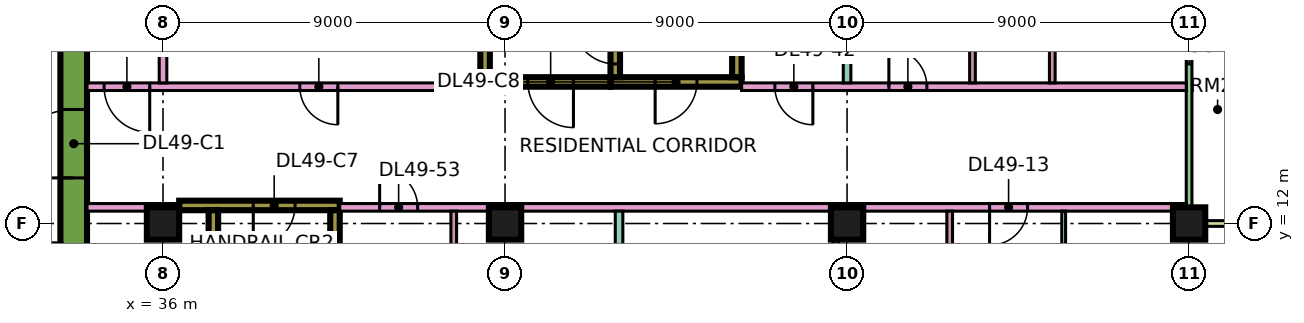
"""IFC4 building model, lengths in metres.
Left out: names, types, materials, properties, quantities, classifications, styles, units other than length and angle.
Written with IfcOpenShell. Run it as: python <this file> out.ifc"""

import sys

from ifc_helpers import new_model, si_unit, direction, frame, frame_2d, origin, origin_2d, place, context, subcontext, project, spatial, rectangle, extrude, element, fill, save


model = new_model("IFC4")
c1 = context("Model", 3, precision=1e-05, world=origin(), true_north=direction((0.0, 1.0)))
c2 = subcontext(c1, "Body", "Model", "MODEL_VIEW")
j1 = project(units=[si_unit("LENGTHUNIT", "METRE"), si_unit("PLANEANGLEUNIT", "RADIAN")], contexts=[c1])
p1 = place(None, origin())
s1 = spatial("IfcSite", under=j1, at=p1, CompositionType="ELEMENT")
p2 = place(p1, origin())
s2 = spatial("IfcBuilding", under=s1, at=p2, CompositionType="ELEMENT")
p3 = place(p2, frame((0.0, 0.0, 211.65)))
s3 = spatial("IfcBuildingStorey", under=s2, at=p3, CompositionType="ELEMENT", Elevation=211.65)
for number, where, z_axis, x_axis in (
    (1, (36.0, 12.0, 0.0), (0.0, 0.0, 1.0), (1.0, 0.0, 0.0)),
    (2, (45.0, 12.0, 0.0), (0.0, 0.0, 1.0), (1.0, 0.0, 0.0)),
    (3, (54.0, 12.0, 0.0), (0.0, 0.0, 1.0), (1.0, 0.0, 0.0)),
    (4, (63.0, 12.0, 0.0), (0.0, 0.0, 1.0), (1.0, 0.0, 0.0)),
):
    element("IfcColumn", number, at=place(p3, frame(where, z_axis=z_axis, x_axis=x_axis)), inside=s3, PredefinedType="COLUMN", context=c2, shape_type="SweptSolid", body=[
        extrude(rectangle(XDim=0.85, YDim=0.85, at=origin_2d()), origin(), (0.0, 0.0, 1.0), 3.75),
    ])
p4 = place(p3, frame((33.65, 7.7, 0.0), z_axis=(0.0, 0.0, 1.0), x_axis=(0.0, 1.0, 0.0)))
e5 = element("IfcWall", 5, at=p4, inside=s3, PredefinedType="SHEAR", context=c2, shape_type="SweptSolid", body=[
    extrude(rectangle(XDim=11.6, YDim=0.7, at=frame_2d((5.8, 0.0))), origin(), (0.0, 0.0, 1.0), 3.75),
])
p5 = place(p4, frame((5.5, 0.0, 0.0)))
e6 = element("IfcOpeningElement", 6, at=p5, cuts=e5, PredefinedType="OPENING", context=c2, shape_type="SweptSolid", body=[
    extrude(rectangle(XDim=1.8, YDim=2.4, at=frame_2d((0.9, 1.2))), frame((0.0, 0.36, 0.0), z_axis=(0.0, -1.0, 0.0), x_axis=(1.0, 0.0, 0.0)), (0.0, 0.0, 1.0), 0.72),
])
p6 = place(p3, frame((36.425, 12.475, 0.0), z_axis=(0.0, 0.0, 1.0), x_axis=(1.0, 0.0, 0.0)))
e7 = element("IfcWall", 7, at=p6, inside=s3, PredefinedType="SHEAR", context=c2, shape_type="SweptSolid", body=[
    extrude(rectangle(XDim=4.225, YDim=0.25, at=frame_2d((2.112, 0.0))), origin(), (0.0, 0.0, 1.0), 3.75),
])
p7 = place(p6, frame((1.95, 0.0, 0.0)))
e8 = element("IfcOpeningElement", 8, at=p7, cuts=e7, PredefinedType="OPENING", context=c2, shape_type="SweptSolid", body=[
    extrude(rectangle(XDim=1.1, YDim=2.2, at=frame_2d((0.55, 1.1))), frame((0.0, 0.135, 0.0), z_axis=(0.0, -1.0, 0.0), x_axis=(1.0, 0.0, 0.0)), (0.0, 0.0, 1.0), 0.27),
])
for number, where, z_axis, x_axis in (
    (9, (37.325, 5.85, 0.0), (0.0, 0.0, 1.0), (0.0, 1.0, 0.0)),
    (10, (40.525, 5.85, 0.0), (0.0, 0.0, 1.0), (0.0, 1.0, 0.0)),
):
    element("IfcWall", number, at=place(p3, frame(where, z_axis=z_axis, x_axis=x_axis)), inside=s3, PredefinedType="SHEAR", context=c2, shape_type="SweptSolid", body=[
        extrude(rectangle(XDim=6.5, YDim=0.25, at=frame_2d((3.25, 0.0))), origin(), (0.0, 0.0, 1.0), 3.75),
    ])
p8 = place(p3, frame((47.775, 15.725, 0.0), z_axis=(0.0, 0.0, 1.0), x_axis=(1.0, 0.0, 0.0)))
e11 = element("IfcWall", 11, at=p8, inside=s3, PredefinedType="SHEAR", context=c2, shape_type="SweptSolid", body=[
    extrude(rectangle(XDim=3.45, YDim=0.25, at=frame_2d((1.725, 0.0))), origin(), (0.0, 0.0, 1.0), 3.75),
])
p9 = place(p8, frame((1.175, 0.0, 0.0)))
e12 = element("IfcOpeningElement", 12, at=p9, cuts=e11, PredefinedType="OPENING", context=c2, shape_type="SweptSolid", body=[
    extrude(rectangle(XDim=1.1, YDim=2.2, at=frame_2d((0.55, 1.1))), frame((0.0, 0.135, 0.0), z_axis=(0.0, -1.0, 0.0), x_axis=(1.0, 0.0, 0.0)), (0.0, 0.0, 1.0), 0.27),
])
p10 = place(p3, frame((47.9, 15.85, 0.0), z_axis=(0.0, 0.0, 1.0), x_axis=(0.0, 1.0, 0.0)))
e13 = element("IfcWall", 13, at=p10, inside=s3, PredefinedType="SHEAR", context=c2, shape_type="SweptSolid", body=[
    extrude(rectangle(XDim=6.5, YDim=0.25, at=frame_2d((3.25, 0.0))), origin(), (0.0, 0.0, 1.0), 3.75),
])
p11 = place(p10, frame((0.35, 0.0, 0.0)))
e14 = element("IfcOpeningElement", 14, at=p11, cuts=e13, PredefinedType="OPENING", context=c2, shape_type="SweptSolid", body=[
    extrude(rectangle(XDim=1.1, YDim=2.2, at=frame_2d((0.55, 1.1))), frame((0.0, 0.135, 0.0), z_axis=(0.0, -1.0, 0.0), x_axis=(1.0, 0.0, 0.0)), (0.0, 0.0, 1.0), 0.27),
])
p12 = place(p3, frame((51.1, 15.85, 0.0), z_axis=(0.0, 0.0, 1.0), x_axis=(0.0, 1.0, 0.0)))
e15 = element("IfcWall", 15, at=p12, inside=s3, PredefinedType="SHEAR", context=c2, shape_type="SweptSolid", body=[
    extrude(rectangle(XDim=6.5, YDim=0.25, at=frame_2d((3.25, 0.0))), origin(), (0.0, 0.0, 1.0), 3.75),
])
p13 = place(p3, frame((44.35, 15.725, 0.0), z_axis=(0.0, 0.0, 1.0), x_axis=(1.0, 0.0, 0.0)))
e16 = element("IfcWall", 16, at=p13, inside=s3, PredefinedType="SHEAR", context=c2, shape_type="SweptSolid", body=[
    extrude(rectangle(XDim=3.425, YDim=0.25, at=frame_2d((1.712, 0.0))), origin(), (0.0, 0.0, 1.0), 3.75),
])
p14 = place(p13, frame((1.25, 0.0, 0.0)))
e17 = element("IfcOpeningElement", 17, at=p14, cuts=e16, PredefinedType="OPENING", context=c2, shape_type="SweptSolid", body=[
    extrude(rectangle(XDim=1.2, YDim=2.2, at=frame_2d((0.6, 1.1))), frame((0.0, 0.135, 0.0), z_axis=(0.0, -1.0, 0.0), x_axis=(1.0, 0.0, 0.0)), (0.0, 0.0, 1.0), 0.27),
])
p15 = place(p3, frame((44.475, 15.85, 0.0), z_axis=(0.0, 0.0, 1.0), x_axis=(0.0, 1.0, 0.0)))
e18 = element("IfcWall", 18, at=p15, inside=s3, PredefinedType="SHEAR", context=c2, shape_type="SweptSolid", body=[
    extrude(rectangle(XDim=6.5, YDim=0.25, at=frame_2d((3.25, 0.0))), origin(), (0.0, 0.0, 1.0), 3.75),
])
p16 = place(p15, frame((1.75, 0.0, 0.0)))
e19 = element("IfcOpeningElement", 19, at=p16, cuts=e18, PredefinedType="OPENING", context=c2, shape_type="SweptSolid", body=[
    extrude(rectangle(XDim=1.1, YDim=2.2, at=frame_2d((0.55, 1.1))), frame((0.0, 0.135, 0.0), z_axis=(0.0, -1.0, 0.0), x_axis=(1.0, 0.0, 0.0)), (0.0, 0.0, 1.0), 0.27),
])
p17 = place(p15, frame((4.3, 0.0, 0.0)))
e20 = element("IfcOpeningElement", 20, at=p17, cuts=e18, PredefinedType="OPENING", context=c2, shape_type="SweptSolid", body=[
    extrude(rectangle(XDim=1.1, YDim=2.2, at=frame_2d((0.55, 1.1))), frame((0.0, 0.135, 0.0), z_axis=(0.0, -1.0, 0.0), x_axis=(1.0, 0.0, 0.0)), (0.0, 0.0, 1.0), 0.27),
])
p18 = place(p3, frame((63.0, 12.075, 0.0), z_axis=(0.0, 0.0, 1.0), x_axis=(0.0, 1.0, 0.0)))
e21 = element("IfcWall", 21, at=p18, inside=s3, PredefinedType="SOLIDWALL", context=c2, shape_type="SweptSolid", body=[
    extrude(rectangle(XDim=10.35, YDim=0.15, at=frame_2d((5.175, 0.0))), origin(), (0.0, 0.0, 1.0), 3.35),
])
p19 = place(p18, frame((4.125, 0.0, 0.45)))
e22 = element("IfcOpeningElement", 22, at=p19, cuts=e21, PredefinedType="OPENING", context=c2, shape_type="SweptSolid", body=[
    extrude(rectangle(XDim=1.8, YDim=2.4, at=frame_2d((0.9, 1.2))), frame((0.0, 0.085, 0.0), z_axis=(0.0, -1.0, 0.0), x_axis=(1.0, 0.0, 0.0)), (0.0, 0.0, 1.0), 0.17),
])
p20 = place(p18, frame((7.538, 0.0, 0.0)))
e23 = element("IfcOpeningElement", 23, at=p20, cuts=e21, PredefinedType="OPENING", context=c2, shape_type="SweptSolid", body=[
    extrude(rectangle(XDim=1.8, YDim=2.4, at=frame_2d((0.9, 1.2))), frame((0.0, 0.085, 0.0), z_axis=(0.0, -1.0, 0.0), x_axis=(1.0, 0.0, 0.0)), (0.0, 0.0, 1.0), 0.17),
])
p21 = place(p3, frame((64.5, 12.0, 0.0), z_axis=(0.0, 0.0, 1.0), x_axis=(-1.0, 0.0, 0.0)))
e24 = element("IfcWall", 24, at=p21, inside=s3, PredefinedType="SOLIDWALL", context=c2, shape_type="SweptSolid", body=[
    extrude(rectangle(XDim=1.5, YDim=0.15, at=frame_2d((0.75, 0.0))), origin(), (0.0, 0.0, 1.0), 3.35),
])
p22 = place(p3, frame((34.0, 12.425, 0.0), z_axis=(0.0, 0.0, 1.0), x_axis=(1.0, 0.0, 0.0)))
e25 = element("IfcWall", 25, at=p22, inside=s3, PredefinedType="PARTITIONING", context=c2, shape_type="SweptSolid", body=[
    extrude(rectangle(XDim=2.426, YDim=0.2, at=frame_2d((1.213, 0.0))), origin(), (0.0, 0.0, 1.0), 3.35),
])
p23 = place(p3, frame((34.0, 15.6, 0.0), z_axis=(0.0, 0.0, 1.0), x_axis=(1.0, 0.0, 0.0)))
e26 = element("IfcWall", 26, at=p23, inside=s3, PredefinedType="PARTITIONING", context=c2, shape_type="SweptSolid", body=[
    extrude(rectangle(XDim=10.35, YDim=0.2, at=frame_2d((5.175, 0.0))), origin(), (0.0, 0.0, 1.0), 3.35),
])
p24 = place(p23, frame((5.6, 0.0, 0.0)))
e27 = element("IfcOpeningElement", 27, at=p24, cuts=e26, PredefinedType="OPENING", context=c2, shape_type="SweptSolid", body=[
    extrude(rectangle(XDim=1.0, YDim=2.1, at=frame_2d((0.5, 1.05))), frame((0.0, 0.11, 0.0), z_axis=(0.0, -1.0, 0.0), x_axis=(1.0, 0.0, 0.0)), (0.0, 0.0, 1.0), 0.22),
])
p25 = place(p23, frame((0.45, 0.0, 0.0)))
e28 = element("IfcOpeningElement", 28, at=p25, cuts=e26, PredefinedType="OPENING", context=c2, shape_type="SweptSolid", body=[
    extrude(rectangle(XDim=1.2, YDim=2.1, at=frame_2d((0.6, 1.05))), frame((0.0, 0.11, 0.0), z_axis=(0.0, -1.0, 0.0), x_axis=(1.0, 0.0, 0.0)), (0.0, 0.0, 1.0), 0.22),
])
p26 = place(p3, frame((36.0, 15.7, 0.0), z_axis=(0.0, 0.0, 1.0), x_axis=(0.0, 1.0, 0.0)))
e29 = element("IfcWall", 29, at=p26, inside=s3, PredefinedType="PARTITIONING", context=c2, shape_type="SweptSolid", body=[
    extrude(rectangle(XDim=8.3, YDim=0.2, at=frame_2d((4.15, 0.0))), origin(), (0.0, 0.0, 1.0), 3.35),
])
p27 = place(p3, frame((40.65, 12.425, 0.0), z_axis=(0.0, 0.0, 1.0), x_axis=(1.0, 0.0, 0.0)))
e30 = element("IfcWall", 30, at=p27, inside=s3, PredefinedType="PARTITIONING", context=c2, shape_type="SweptSolid", body=[
    extrude(rectangle(XDim=22.276, YDim=0.2, at=frame_2d((11.138, 0.0))), origin(), (0.0, 0.0, 1.0), 3.35),
])
p28 = place(p27, frame((17.1, 0.0, 0.0)))
e31 = element("IfcOpeningElement", 31, at=p28, cuts=e30, PredefinedType="OPENING", context=c2, shape_type="SweptSolid", body=[
    extrude(rectangle(XDim=1.0, YDim=2.1, at=frame_2d((0.5, 1.05))), frame((0.0, 0.11, 0.0), z_axis=(0.0, -1.0, 0.0), x_axis=(1.0, 0.0, 0.0)), (0.0, 0.0, 1.0), 0.22),
])
p29 = place(p27, frame((1.05, 0.0, 0.0)))
e32 = element("IfcOpeningElement", 32, at=p29, cuts=e30, PredefinedType="OPENING", context=c2, shape_type="SweptSolid", body=[
    extrude(rectangle(XDim=1.0, YDim=2.1, at=frame_2d((0.5, 1.05))), frame((0.0, 0.11, 0.0), z_axis=(0.0, -1.0, 0.0), x_axis=(1.0, 0.0, 0.0)), (0.0, 0.0, 1.0), 0.22),
])
p30 = place(p3, frame((43.65, 5.825, 0.0), z_axis=(0.0, 0.0, 1.0), x_axis=(0.0, 1.0, 0.0)))
e33 = element("IfcWall", 33, at=p30, inside=s3, PredefinedType="PARTITIONING", context=c2, shape_type="SweptSolid", body=[
    extrude(rectangle(XDim=6.5, YDim=0.15, at=frame_2d((3.25, 0.0))), origin(), (0.0, 0.0, 1.0), 3.35),
])
p31 = place(p30, frame((4.425, 0.0, 0.0)))
e34 = element("IfcOpeningElement", 34, at=p31, cuts=e33, PredefinedType="OPENING", context=c2, shape_type="SweptSolid", body=[
    extrude(rectangle(XDim=0.9, YDim=2.1, at=frame_2d((0.45, 1.05))), frame((0.0, 0.085, 0.0), z_axis=(0.0, -1.0, 0.0), x_axis=(1.0, 0.0, 0.0)), (0.0, 0.0, 1.0), 0.17),
])
p32 = place(p3, frame((48.0, 5.825, 0.0), z_axis=(0.0, 0.0, 1.0), x_axis=(0.0, 1.0, 0.0)))
e35 = element("IfcWall", 35, at=p32, inside=s3, PredefinedType="PARTITIONING", context=c2, shape_type="SweptSolid", body=[
    extrude(rectangle(XDim=6.5, YDim=0.2, at=frame_2d((3.25, 0.0))), origin(), (0.0, 0.0, 1.0), 3.35),
])
p33 = place(p3, frame((51.225, 15.6, 0.0), z_axis=(0.0, 0.0, 1.0), x_axis=(1.0, 0.0, 0.0)))
e36 = element("IfcWall", 36, at=p33, inside=s3, PredefinedType="PARTITIONING", context=c2, shape_type="SweptSolid", body=[
    extrude(rectangle(XDim=11.701, YDim=0.2, at=frame_2d((5.851, 0.0))), origin(), (0.0, 0.0, 1.0), 3.35),
])
p34 = place(p33, frame((3.875, 0.0, 0.0)))
e37 = element("IfcOpeningElement", 37, at=p34, cuts=e36, PredefinedType="OPENING", context=c2, shape_type="SweptSolid", body=[
    extrude(rectangle(XDim=1.0, YDim=2.1, at=frame_2d((0.5, 1.05))), frame((0.0, 0.11, 0.0), z_axis=(0.0, -1.0, 0.0), x_axis=(1.0, 0.0, 0.0)), (0.0, 0.0, 1.0), 0.22),
])
p35 = place(p33, frame((0.875, 0.0, 0.0)))
e38 = element("IfcOpeningElement", 38, at=p35, cuts=e36, PredefinedType="OPENING", context=c2, shape_type="SweptSolid", body=[
    extrude(rectangle(XDim=1.0, YDim=2.1, at=frame_2d((0.5, 1.05))), frame((0.0, 0.11, 0.0), z_axis=(0.0, -1.0, 0.0), x_axis=(1.0, 0.0, 0.0)), (0.0, 0.0, 1.0), 0.22),
])
p36 = place(p3, frame((53.7, 7.1, 0.0), z_axis=(0.0, 0.0, 1.0), x_axis=(0.0, 1.0, 0.0)))
e39 = element("IfcWall", 39, at=p36, inside=s3, PredefinedType="PARTITIONING", context=c2, shape_type="SweptSolid", body=[
    extrude(rectangle(XDim=5.225, YDim=0.15, at=frame_2d((2.612, 0.0))), origin(), (0.0, 0.0, 1.0), 3.35),
])
p37 = place(p3, frame((54.0, 15.7, 0.0), z_axis=(0.0, 0.0, 1.0), x_axis=(0.0, 1.0, 0.0)))
e40 = element("IfcWall", 40, at=p37, inside=s3, PredefinedType="PARTITIONING", context=c2, shape_type="SweptSolid", body=[
    extrude(rectangle(XDim=8.3, YDim=0.2, at=frame_2d((4.15, 0.0))), origin(), (0.0, 0.0, 1.0), 3.35),
])
p38 = place(p3, frame((56.7, 7.1, 0.0), z_axis=(0.0, 0.0, 1.0), x_axis=(0.0, 1.0, 0.0)))
e41 = element("IfcWall", 41, at=p38, inside=s3, PredefinedType="PARTITIONING", context=c2, shape_type="SweptSolid", body=[
    extrude(rectangle(XDim=5.225, YDim=0.15, at=frame_2d((2.612, 0.0))), origin(), (0.0, 0.0, 1.0), 3.35),
])
for number, where, z_axis, x_axis in (
    (42, (57.3, 15.7, 0.0), (0.0, 0.0, 1.0), (0.0, 1.0, 0.0)),
    (43, (59.4, 15.7, 0.0), (0.0, 0.0, 1.0), (0.0, 1.0, 0.0)),
):
    element("IfcWall", number, at=place(p3, frame(where, z_axis=z_axis, x_axis=x_axis)), inside=s3, PredefinedType="PARTITIONING", context=c2, shape_type="SweptSolid", body=[
        extrude(rectangle(XDim=2.825, YDim=0.15, at=frame_2d((1.413, 0.0))), origin(), (0.0, 0.0, 1.0), 3.35),
    ])
p39 = place(p3, frame((59.7, 6.975, 0.0), z_axis=(0.0, 0.0, 1.0), x_axis=(0.0, 1.0, 0.0)))
e44 = element("IfcWall", 44, at=p39, inside=s3, PredefinedType="PARTITIONING", context=c2, shape_type="SweptSolid", body=[
    extrude(rectangle(XDim=5.35, YDim=0.1, at=frame_2d((2.675, 0.0))), origin(), (0.0, 0.0, 1.0), 3.35),
])
p40 = place(p39, frame((2.3, 0.0, 0.0)))
e45 = element("IfcOpeningElement", 45, at=p40, cuts=e44, PredefinedType="OPENING", context=c2, shape_type="SweptSolid", body=[
    extrude(rectangle(XDim=0.9, YDim=2.1, at=frame_2d((0.45, 1.05))), frame((0.0, 0.06, 0.0), z_axis=(0.0, -1.0, 0.0), x_axis=(1.0, 0.0, 0.0)), (0.0, 0.0, 1.0), 0.12),
])
p41 = place(p19, origin())
e46 = element("IfcWindow", 46, at=p41, inside=s3, PartitioningType="SINGLE_PANEL", PredefinedType="WINDOW", context=c2, shape_type="SweptSolid", body=[
    extrude(rectangle(XDim=1.8, YDim=2.4, at=frame_2d((0.9, 1.2))), frame((0.0, 0.03, 0.0), z_axis=(0.0, -1.0, 0.0), x_axis=(1.0, 0.0, 0.0)), (0.0, 0.0, 1.0), 0.06),
])
fill(e22, e46)
p42 = place(p5, origin())
e47 = element("IfcDoor", 47, at=p42, inside=s3, OperationType="DOUBLE_DOOR_SINGLE_SWING", PredefinedType="DOOR", context=c2, shape_type="SweptSolid", body=[
    extrude(rectangle(XDim=1.8, YDim=2.4, at=frame_2d((0.9, 1.2))), frame((0.0, 0.025, 0.0), z_axis=(0.0, -1.0, 0.0), x_axis=(1.0, 0.0, 0.0)), (0.0, 0.0, 1.0), 0.05),
])
fill(e6, e47)
p43 = place(p7, frame((1.1, 0.0, 0.0), z_axis=(0.0, 0.0, 1.0), x_axis=(-1.0, 0.0, 0.0)))
e48 = element("IfcDoor", 48, at=p43, inside=s3, OperationType="SINGLE_SWING_LEFT", PredefinedType="DOOR", context=c2, shape_type="SweptSolid", body=[
    extrude(rectangle(XDim=1.1, YDim=2.2, at=frame_2d((0.55, 1.1))), frame((0.0, 0.025, 0.0), z_axis=(0.0, -1.0, 0.0), x_axis=(1.0, 0.0, 0.0)), (0.0, 0.0, 1.0), 0.05),
])
fill(e8, e48)
p44 = place(p9, frame((1.1, 0.0, 0.0), z_axis=(0.0, 0.0, 1.0), x_axis=(-1.0, 0.0, 0.0)))
e49 = element("IfcDoor", 49, at=p44, inside=s3, OperationType="SINGLE_SWING_LEFT", PredefinedType="DOOR", context=c2, shape_type="SweptSolid", body=[
    extrude(rectangle(XDim=1.1, YDim=2.2, at=frame_2d((0.55, 1.1))), frame((0.0, 0.025, 0.0), z_axis=(0.0, -1.0, 0.0), x_axis=(1.0, 0.0, 0.0)), (0.0, 0.0, 1.0), 0.05),
])
fill(e12, e49)
p45 = place(p14, origin())
e50 = element("IfcDoor", 50, at=p45, inside=s3, OperationType="SINGLE_SWING_RIGHT", PredefinedType="DOOR", context=c2, shape_type="SweptSolid", body=[
    extrude(rectangle(XDim=1.2, YDim=2.2, at=frame_2d((0.6, 1.1))), frame((0.0, 0.025, 0.0), z_axis=(0.0, -1.0, 0.0), x_axis=(1.0, 0.0, 0.0)), (0.0, 0.0, 1.0), 0.05),
])
fill(e17, e50)
p46 = place(p11, frame((1.1, 0.0, 0.0), z_axis=(0.0, 0.0, 1.0), x_axis=(-1.0, 0.0, 0.0)))
e51 = element("IfcDoor", 51, at=p46, inside=s3, OperationType="SINGLE_SWING_RIGHT", PredefinedType="DOOR", context=c2, shape_type="SweptSolid", body=[
    extrude(rectangle(XDim=1.1, YDim=2.2, at=frame_2d((0.55, 1.1))), frame((0.0, 0.025, 0.0), z_axis=(0.0, -1.0, 0.0), x_axis=(1.0, 0.0, 0.0)), (0.0, 0.0, 1.0), 0.05),
])
fill(e14, e51)
p47 = place(p24, origin())
e52 = element("IfcDoor", 52, at=p47, inside=s3, OperationType="SINGLE_SWING_RIGHT", PredefinedType="DOOR", context=c2, shape_type="SweptSolid", body=[
    extrude(rectangle(XDim=1.0, YDim=2.1, at=frame_2d((0.5, 1.05))), frame((0.0, 0.025, 0.0), z_axis=(0.0, -1.0, 0.0), x_axis=(1.0, 0.0, 0.0)), (0.0, 0.0, 1.0), 0.05),
])
fill(e27, e52)
p48 = place(p34, origin())
e53 = element("IfcDoor", 53, at=p48, inside=s3, OperationType="SINGLE_SWING_LEFT", PredefinedType="DOOR", context=c2, shape_type="SweptSolid", body=[
    extrude(rectangle(XDim=1.0, YDim=2.1, at=frame_2d((0.5, 1.05))), frame((0.0, 0.025, 0.0), z_axis=(0.0, -1.0, 0.0), x_axis=(1.0, 0.0, 0.0)), (0.0, 0.0, 1.0), 0.05),
])
fill(e37, e53)
p49 = place(p28, frame((1.0, 0.0, 0.0), z_axis=(0.0, 0.0, 1.0), x_axis=(-1.0, 0.0, 0.0)))
e54 = element("IfcDoor", 54, at=p49, inside=s3, OperationType="SINGLE_SWING_LEFT", PredefinedType="DOOR", context=c2, shape_type="SweptSolid", body=[
    extrude(rectangle(XDim=1.0, YDim=2.1, at=frame_2d((0.5, 1.05))), frame((0.0, 0.025, 0.0), z_axis=(0.0, -1.0, 0.0), x_axis=(1.0, 0.0, 0.0)), (0.0, 0.0, 1.0), 0.05),
])
fill(e31, e54)
p50 = place(p25, origin())
e55 = element("IfcDoor", 55, at=p50, inside=s3, OperationType="SINGLE_SWING_RIGHT", PredefinedType="DOOR", context=c2, shape_type="SweptSolid", body=[
    extrude(rectangle(XDim=1.2, YDim=2.1, at=frame_2d((0.6, 1.05))), frame((0.0, 0.025, 0.0), z_axis=(0.0, -1.0, 0.0), x_axis=(1.0, 0.0, 0.0)), (0.0, 0.0, 1.0), 0.05),
])
fill(e28, e55)
p51 = place(p35, origin())
e56 = element("IfcDoor", 56, at=p51, inside=s3, OperationType="SINGLE_SWING_RIGHT", PredefinedType="DOOR", context=c2, shape_type="SweptSolid", body=[
    extrude(rectangle(XDim=1.0, YDim=2.1, at=frame_2d((0.5, 1.05))), frame((0.0, 0.025, 0.0), z_axis=(0.0, -1.0, 0.0), x_axis=(1.0, 0.0, 0.0)), (0.0, 0.0, 1.0), 0.05),
])
fill(e38, e56)
p52 = place(p29, origin())
e57 = element("IfcDoor", 57, at=p52, inside=s3, OperationType="SINGLE_SWING_LEFT", PredefinedType="DOOR", context=c2, shape_type="SweptSolid", body=[
    extrude(rectangle(XDim=1.0, YDim=2.1, at=frame_2d((0.5, 1.05))), frame((0.0, 0.025, 0.0), z_axis=(0.0, -1.0, 0.0), x_axis=(1.0, 0.0, 0.0)), (0.0, 0.0, 1.0), 0.05),
])
fill(e32, e57)
save(model, sys.argv[1])
